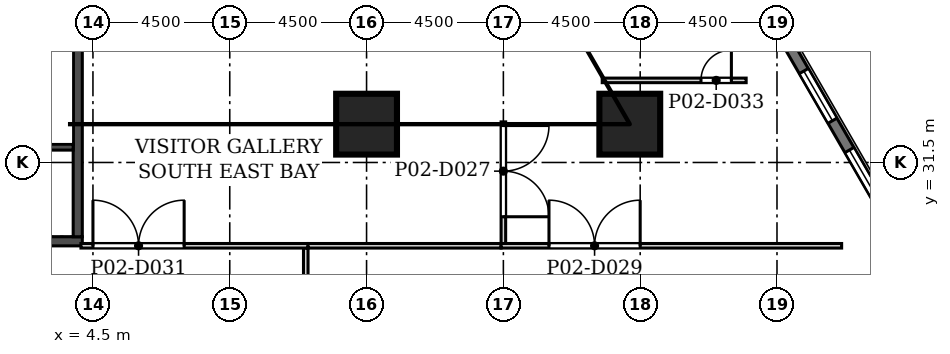
"""IFC4 building model, lengths in metres.
Left out: names, types, materials, properties, quantities, classifications, styles, units other than length and angle.
Written with IfcOpenShell. Run it as: python <this file> out.ifc"""

import sys

from ifc_helpers import new_model, si_unit, direction, frame, frame_2d, origin, origin_2d, place, context, subcontext, project, spatial, rectangle, extrude, element, fill, save


model = new_model("IFC4")
c1 = context("Model", 3, precision=1e-05, world=origin(), true_north=direction((0.0, 1.0)))
c2 = subcontext(c1, "Body", "Model", "MODEL_VIEW")
j1 = project(units=[si_unit("LENGTHUNIT", "METRE"), si_unit("PLANEANGLEUNIT", "RADIAN")], contexts=[c1])
p1 = place(None, origin())
s1 = spatial("IfcSite", under=j1, at=p1, CompositionType="ELEMENT")
p2 = place(p1, origin())
s2 = spatial("IfcBuilding", under=s1, at=p2, CompositionType="ELEMENT")
p3 = place(p2, frame((0.0, 0.0, 14.0)))
s3 = spatial("IfcBuildingStorey", under=s2, at=p3, CompositionType="ELEMENT", Elevation=14.0)
for number, where, z_axis, x_axis in (
    (1, (22.158, 32.76, 0.0), (0.0, 0.0, 1.0), (1.0, 0.0, 0.0)),
    (2, (13.5, 32.76, 0.0), (0.0, 0.0, 1.0), (1.0, 0.0, 0.0)),
):
    element("IfcColumn", number, at=place(p3, frame(where, z_axis=z_axis, x_axis=x_axis)), inside=s3, PredefinedType="COLUMN", context=c2, shape_type="SweptSolid", body=[
        extrude(rectangle(XDim=2.0, YDim=2.0, at=origin_2d()), origin(), (0.0, 0.0, 1.0), 6.0),
    ])
p4 = place(p3, frame((42.853, 8.575, 0.0), z_axis=(0.0, 0.0, 1.0), x_axis=(-0.49999894854, 0.866026010844, 0.0)))
e3 = element("IfcWall", 3, at=p4, inside=s3, PredefinedType="SOLIDWALL", context=c2, shape_type="SweptSolid", body=[
    extrude(rectangle(XDim=76.0, YDim=0.34, at=frame_2d((38.0, 0.0))), origin(), (0.0, 0.0, 1.0), 5.7),
])
p5 = place(p4, frame((1.058, 0.0, 0.9)))
e4 = element("IfcOpeningElement", 4, at=p5, cuts=e3, PredefinedType="OPENING", context=c2, shape_type="SweptSolid", body=[
    extrude(rectangle(XDim=1.885, YDim=3.5, at=frame_2d((0.942, 1.75))), frame((0.0, 0.18, 0.0), z_axis=(0.0, -1.0, 0.0), x_axis=(1.0, 0.0, 0.0)), (0.0, 0.0, 1.0), 0.36),
])
p6 = place(p4, frame((4.058, 0.0, 0.9)))
e5 = element("IfcOpeningElement", 5, at=p6, cuts=e3, PredefinedType="OPENING", context=c2, shape_type="SweptSolid", body=[
    extrude(rectangle(XDim=1.885, YDim=3.5, at=frame_2d((0.942, 1.75))), frame((0.0, 0.18, 0.0), z_axis=(0.0, -1.0, 0.0), x_axis=(1.0, 0.0, 0.0)), (0.0, 0.0, 1.0), 0.36),
])
p7 = place(p4, frame((7.058, 0.0, 0.9)))
e6 = element("IfcOpeningElement", 6, at=p7, cuts=e3, PredefinedType="OPENING", context=c2, shape_type="SweptSolid", body=[
    extrude(rectangle(XDim=1.885, YDim=3.5, at=frame_2d((0.942, 1.75))), frame((0.0, 0.18, 0.0), z_axis=(0.0, -1.0, 0.0), x_axis=(1.0, 0.0, 0.0)), (0.0, 0.0, 1.0), 0.36),
])
p8 = place(p4, frame((10.058, 0.0, 0.9)))
e7 = element("IfcOpeningElement", 7, at=p8, cuts=e3, PredefinedType="OPENING", context=c2, shape_type="SweptSolid", body=[
    extrude(rectangle(XDim=1.885, YDim=3.5, at=frame_2d((0.942, 1.75))), frame((0.0, 0.18, 0.0), z_axis=(0.0, -1.0, 0.0), x_axis=(1.0, 0.0, 0.0)), (0.0, 0.0, 1.0), 0.36),
])
p9 = place(p4, frame((13.058, 0.0, 0.9)))
e8 = element("IfcOpeningElement", 8, at=p9, cuts=e3, PredefinedType="OPENING", context=c2, shape_type="SweptSolid", body=[
    extrude(rectangle(XDim=1.885, YDim=3.5, at=frame_2d((0.942, 1.75))), frame((0.0, 0.18, 0.0), z_axis=(0.0, -1.0, 0.0), x_axis=(1.0, 0.0, 0.0)), (0.0, 0.0, 1.0), 0.36),
])
p10 = place(p4, frame((16.058, 0.0, 0.9)))
e9 = element("IfcOpeningElement", 9, at=p10, cuts=e3, PredefinedType="OPENING", context=c2, shape_type="SweptSolid", body=[
    extrude(rectangle(XDim=1.885, YDim=3.5, at=frame_2d((0.942, 1.75))), frame((0.0, 0.18, 0.0), z_axis=(0.0, -1.0, 0.0), x_axis=(1.0, 0.0, 0.0)), (0.0, 0.0, 1.0), 0.36),
])
p11 = place(p4, frame((19.058, 0.0, 0.9)))
e10 = element("IfcOpeningElement", 10, at=p11, cuts=e3, PredefinedType="OPENING", context=c2, shape_type="SweptSolid", body=[
    extrude(rectangle(XDim=1.885, YDim=3.5, at=frame_2d((0.942, 1.75))), frame((0.0, 0.18, 0.0), z_axis=(0.0, -1.0, 0.0), x_axis=(1.0, 0.0, 0.0)), (0.0, 0.0, 1.0), 0.36),
])
p12 = place(p4, frame((22.058, 0.0, 0.9)))
e11 = element("IfcOpeningElement", 11, at=p12, cuts=e3, PredefinedType="OPENING", context=c2, shape_type="SweptSolid", body=[
    extrude(rectangle(XDim=1.885, YDim=3.5, at=frame_2d((0.942, 1.75))), frame((0.0, 0.18, 0.0), z_axis=(0.0, -1.0, 0.0), x_axis=(1.0, 0.0, 0.0)), (0.0, 0.0, 1.0), 0.36),
])
p13 = place(p4, frame((25.058, 0.0, 0.9)))
e12 = element("IfcOpeningElement", 12, at=p13, cuts=e3, PredefinedType="OPENING", context=c2, shape_type="SweptSolid", body=[
    extrude(rectangle(XDim=1.885, YDim=3.5, at=frame_2d((0.942, 1.75))), frame((0.0, 0.18, 0.0), z_axis=(0.0, -1.0, 0.0), x_axis=(1.0, 0.0, 0.0)), (0.0, 0.0, 1.0), 0.36),
])
p14 = place(p4, frame((28.058, 0.0, 0.9)))
e13 = element("IfcOpeningElement", 13, at=p14, cuts=e3, PredefinedType="OPENING", context=c2, shape_type="SweptSolid", body=[
    extrude(rectangle(XDim=1.885, YDim=3.5, at=frame_2d((0.942, 1.75))), frame((0.0, 0.18, 0.0), z_axis=(0.0, -1.0, 0.0), x_axis=(1.0, 0.0, 0.0)), (0.0, 0.0, 1.0), 0.36),
])
p15 = place(p4, frame((31.058, 0.0, 0.9)))
e14 = element("IfcOpeningElement", 14, at=p15, cuts=e3, PredefinedType="OPENING", context=c2, shape_type="SweptSolid", body=[
    extrude(rectangle(XDim=1.885, YDim=3.5, at=frame_2d((0.942, 1.75))), frame((0.0, 0.18, 0.0), z_axis=(0.0, -1.0, 0.0), x_axis=(1.0, 0.0, 0.0)), (0.0, 0.0, 1.0), 0.36),
])
p16 = place(p4, frame((34.058, 0.0, 0.9)))
e15 = element("IfcOpeningElement", 15, at=p16, cuts=e3, PredefinedType="OPENING", context=c2, shape_type="SweptSolid", body=[
    extrude(rectangle(XDim=1.885, YDim=3.5, at=frame_2d((0.942, 1.75))), frame((0.0, 0.18, 0.0), z_axis=(0.0, -1.0, 0.0), x_axis=(1.0, 0.0, 0.0)), (0.0, 0.0, 1.0), 0.36),
])
p17 = place(p4, frame((37.058, 0.0, 0.9)))
e16 = element("IfcOpeningElement", 16, at=p17, cuts=e3, PredefinedType="OPENING", context=c2, shape_type="SweptSolid", body=[
    extrude(rectangle(XDim=1.885, YDim=3.5, at=frame_2d((0.942, 1.75))), frame((0.0, 0.18, 0.0), z_axis=(0.0, -1.0, 0.0), x_axis=(1.0, 0.0, 0.0)), (0.0, 0.0, 1.0), 0.36),
])
p18 = place(p4, frame((40.058, 0.0, 0.9)))
e17 = element("IfcOpeningElement", 17, at=p18, cuts=e3, PredefinedType="OPENING", context=c2, shape_type="SweptSolid", body=[
    extrude(rectangle(XDim=1.885, YDim=3.5, at=frame_2d((0.942, 1.75))), frame((0.0, 0.18, 0.0), z_axis=(0.0, -1.0, 0.0), x_axis=(1.0, 0.0, 0.0)), (0.0, 0.0, 1.0), 0.36),
])
p19 = place(p4, frame((43.058, 0.0, 0.9)))
e18 = element("IfcOpeningElement", 18, at=p19, cuts=e3, PredefinedType="OPENING", context=c2, shape_type="SweptSolid", body=[
    extrude(rectangle(XDim=1.885, YDim=3.5, at=frame_2d((0.942, 1.75))), frame((0.0, 0.18, 0.0), z_axis=(0.0, -1.0, 0.0), x_axis=(1.0, 0.0, 0.0)), (0.0, 0.0, 1.0), 0.36),
])
p20 = place(p4, frame((46.058, 0.0, 0.9)))
e19 = element("IfcOpeningElement", 19, at=p20, cuts=e3, PredefinedType="OPENING", context=c2, shape_type="SweptSolid", body=[
    extrude(rectangle(XDim=1.885, YDim=3.5, at=frame_2d((0.942, 1.75))), frame((0.0, 0.18, 0.0), z_axis=(0.0, -1.0, 0.0), x_axis=(1.0, 0.0, 0.0)), (0.0, 0.0, 1.0), 0.36),
])
p21 = place(p4, frame((49.058, 0.0, 0.9)))
e20 = element("IfcOpeningElement", 20, at=p21, cuts=e3, PredefinedType="OPENING", context=c2, shape_type="SweptSolid", body=[
    extrude(rectangle(XDim=1.885, YDim=3.5, at=frame_2d((0.942, 1.75))), frame((0.0, 0.18, 0.0), z_axis=(0.0, -1.0, 0.0), x_axis=(1.0, 0.0, 0.0)), (0.0, 0.0, 1.0), 0.36),
])
p22 = place(p4, frame((52.058, 0.0, 0.9)))
e21 = element("IfcOpeningElement", 21, at=p22, cuts=e3, PredefinedType="OPENING", context=c2, shape_type="SweptSolid", body=[
    extrude(rectangle(XDim=1.885, YDim=3.5, at=frame_2d((0.942, 1.75))), frame((0.0, 0.18, 0.0), z_axis=(0.0, -1.0, 0.0), x_axis=(1.0, 0.0, 0.0)), (0.0, 0.0, 1.0), 0.36),
])
p23 = place(p4, frame((55.058, 0.0, 0.9)))
e22 = element("IfcOpeningElement", 22, at=p23, cuts=e3, PredefinedType="OPENING", context=c2, shape_type="SweptSolid", body=[
    extrude(rectangle(XDim=1.885, YDim=3.5, at=frame_2d((0.942, 1.75))), frame((0.0, 0.18, 0.0), z_axis=(0.0, -1.0, 0.0), x_axis=(1.0, 0.0, 0.0)), (0.0, 0.0, 1.0), 0.36),
])
p24 = place(p4, frame((58.058, 0.0, 0.9)))
e23 = element("IfcOpeningElement", 23, at=p24, cuts=e3, PredefinedType="OPENING", context=c2, shape_type="SweptSolid", body=[
    extrude(rectangle(XDim=1.885, YDim=3.5, at=frame_2d((0.942, 1.75))), frame((0.0, 0.18, 0.0), z_axis=(0.0, -1.0, 0.0), x_axis=(1.0, 0.0, 0.0)), (0.0, 0.0, 1.0), 0.36),
])
p25 = place(p4, frame((61.058, 0.0, 0.9)))
e24 = element("IfcOpeningElement", 24, at=p25, cuts=e3, PredefinedType="OPENING", context=c2, shape_type="SweptSolid", body=[
    extrude(rectangle(XDim=1.885, YDim=3.5, at=frame_2d((0.942, 1.75))), frame((0.0, 0.18, 0.0), z_axis=(0.0, -1.0, 0.0), x_axis=(1.0, 0.0, 0.0)), (0.0, 0.0, 1.0), 0.36),
])
p26 = place(p4, frame((64.058, 0.0, 0.9)))
e25 = element("IfcOpeningElement", 25, at=p26, cuts=e3, PredefinedType="OPENING", context=c2, shape_type="SweptSolid", body=[
    extrude(rectangle(XDim=1.885, YDim=3.5, at=frame_2d((0.942, 1.75))), frame((0.0, 0.18, 0.0), z_axis=(0.0, -1.0, 0.0), x_axis=(1.0, 0.0, 0.0)), (0.0, 0.0, 1.0), 0.36),
])
p27 = place(p4, frame((67.058, 0.0, 0.9)))
e26 = element("IfcOpeningElement", 26, at=p27, cuts=e3, PredefinedType="OPENING", context=c2, shape_type="SweptSolid", body=[
    extrude(rectangle(XDim=1.885, YDim=3.5, at=frame_2d((0.942, 1.75))), frame((0.0, 0.18, 0.0), z_axis=(0.0, -1.0, 0.0), x_axis=(1.0, 0.0, 0.0)), (0.0, 0.0, 1.0), 0.36),
])
p28 = place(p4, frame((70.058, 0.0, 0.9)))
e27 = element("IfcOpeningElement", 27, at=p28, cuts=e3, PredefinedType="OPENING", context=c2, shape_type="SweptSolid", body=[
    extrude(rectangle(XDim=1.885, YDim=3.5, at=frame_2d((0.942, 1.75))), frame((0.0, 0.18, 0.0), z_axis=(0.0, -1.0, 0.0), x_axis=(1.0, 0.0, 0.0)), (0.0, 0.0, 1.0), 0.36),
])
p29 = place(p4, frame((73.058, 0.0, 0.9)))
e28 = element("IfcOpeningElement", 28, at=p29, cuts=e3, PredefinedType="OPENING", context=c2, shape_type="SweptSolid", body=[
    extrude(rectangle(XDim=1.885, YDim=3.5, at=frame_2d((0.942, 1.75))), frame((0.0, 0.18, 0.0), z_axis=(0.0, -1.0, 0.0), x_axis=(1.0, 0.0, 0.0)), (0.0, 0.0, 1.0), 0.36),
])
p30 = place(p3, frame((-4.15, 28.907, -0.3), z_axis=(0.0, 0.0, 1.0), x_axis=(1.0, 0.0, 0.0)))
e29 = element("IfcWall", 29, at=p30, inside=s3, PredefinedType="SOLIDWALL", context=c2, shape_type="SweptSolid", body=[
    extrude(rectangle(XDim=8.3, YDim=0.3, at=frame_2d((4.15, 0.0))), origin(), (0.0, 0.0, 1.0), 6.0),
])
p31 = place(p30, frame((1.55, 0.0, 0.3)))
e30 = element("IfcOpeningElement", 30, at=p31, cuts=e29, PredefinedType="OPENING", context=c2, shape_type="SweptSolid", body=[
    extrude(rectangle(XDim=1.2, YDim=2.1, at=frame_2d((0.6, 1.05))), frame((0.0, 0.16, 0.0), z_axis=(0.0, -1.0, 0.0), x_axis=(1.0, 0.0, 0.0)), (0.0, 0.0, 1.0), 0.32),
])
p32 = place(p3, frame((4.0, 29.057, -0.3), z_axis=(0.0, 0.0, 1.0), x_axis=(0.0, 1.0, 0.0)))
e31 = element("IfcWall", 31, at=p32, inside=s3, PredefinedType="SOLIDWALL", context=c2, shape_type="SweptSolid", body=[
    extrude(rectangle(XDim=6.5, YDim=0.3, at=frame_2d((3.25, 0.0))), origin(), (0.0, 0.0, 1.0), 6.0),
])
p33 = place(p3, frame((-3.85, 32.007, -0.3), z_axis=(0.0, 0.0, 1.0), x_axis=(1.0, 0.0, 0.0)))
e32 = element("IfcWall", 32, at=p33, inside=s3, PredefinedType="SOLIDWALL", context=c2, shape_type="SweptSolid", body=[
    extrude(rectangle(XDim=7.7, YDim=0.2, at=frame_2d((3.85, 0.0))), origin(), (0.0, 0.0, 1.0), 6.0),
])
p34 = place(p33, frame((0.1, 0.0, 0.3)))
e33 = element("IfcOpeningElement", 33, at=p34, cuts=e32, PredefinedType="OPENING", context=c2, shape_type="SweptSolid", body=[
    extrude(rectangle(XDim=1.2, YDim=2.1, at=frame_2d((0.6, 1.05))), frame((0.0, 0.11, 0.0), z_axis=(0.0, -1.0, 0.0), x_axis=(1.0, 0.0, 0.0)), (0.0, 0.0, 1.0), 0.22),
])
p35 = place(p3, frame((11.5, 28.685, 0.0), z_axis=(0.0, 0.0, 1.0), x_axis=(0.0, -1.0, 0.0)))
e34 = element("IfcWall", 34, at=p35, inside=s3, PredefinedType="PARTITIONING", context=c2, shape_type="SweptSolid", body=[
    extrude(rectangle(XDim=5.76, YDim=0.15, at=frame_2d((2.88, 0.0))), origin(), (0.0, 0.0, 1.0), 5.7),
])
p36 = place(p35, frame((1.185, 0.0, 0.0)))
e35 = element("IfcOpeningElement", 35, at=p36, cuts=e34, PredefinedType="OPENING", context=c2, shape_type="SweptSolid", body=[
    extrude(rectangle(XDim=3.0, YDim=2.4, at=frame_2d((1.5, 1.2))), frame((0.0, 0.085, 0.0), z_axis=(0.0, -1.0, 0.0), x_axis=(1.0, 0.0, 0.0)), (0.0, 0.0, 1.0), 0.17),
])
p37 = place(p3, frame((4.105, 28.76, 0.0), z_axis=(0.0, 0.0, 1.0), x_axis=(1.0, 0.0, 0.0)))
e36 = element("IfcWall", 36, at=p37, inside=s3, PredefinedType="PARTITIONING", context=c2, shape_type="SweptSolid", body=[
    extrude(rectangle(XDim=7.47, YDim=0.15, at=frame_2d((3.735, 0.0))), origin(), (0.0, 0.0, 1.0), 5.7),
])
p38 = place(p37, frame((0.395, 0.0, 0.0)))
e37 = element("IfcOpeningElement", 37, at=p38, cuts=e36, PredefinedType="OPENING", context=c2, shape_type="SweptSolid", body=[
    extrude(rectangle(XDim=3.0, YDim=2.4, at=frame_2d((1.5, 1.2))), frame((0.0, 0.085, 0.0), z_axis=(0.0, -1.0, 0.0), x_axis=(1.0, 0.0, 0.0)), (0.0, 0.0, 1.0), 0.17),
])
p39 = place(p3, frame((11.575, 28.76, 0.0), z_axis=(0.0, 0.0, 1.0), x_axis=(1.0, 0.0, 0.0)))
e38 = element("IfcWall", 38, at=p39, inside=s3, PredefinedType="PARTITIONING", context=c2, shape_type="SweptSolid", body=[
    extrude(rectangle(XDim=6.35, YDim=0.15, at=frame_2d((3.175, 0.0))), origin(), (0.0, 0.0, 1.0), 5.7),
])
p40 = place(p3, frame((17.925, 28.76, 0.0), z_axis=(0.0, 0.0, 1.0), x_axis=(1.0, 0.0, 0.0)))
e39 = element("IfcWall", 39, at=p40, inside=s3, PredefinedType="PARTITIONING", context=c2, shape_type="SweptSolid", body=[
    extrude(rectangle(XDim=11.201, YDim=0.15, at=frame_2d((5.601, 0.0))), origin(), (0.0, 0.0, 1.0), 5.7),
])
p41 = place(p40, frame((1.575, 0.0, 0.0)))
e40 = element("IfcOpeningElement", 40, at=p41, cuts=e39, PredefinedType="OPENING", context=c2, shape_type="SweptSolid", body=[
    extrude(rectangle(XDim=3.0, YDim=2.4, at=frame_2d((1.5, 1.2))), frame((0.0, 0.085, 0.0), z_axis=(0.0, -1.0, 0.0), x_axis=(1.0, 0.0, 0.0)), (0.0, 0.0, 1.0), 0.17),
])
p42 = place(p3, frame((18.0, 28.835, 0.0), z_axis=(0.0, 0.0, 1.0), x_axis=(0.0, 1.0, 0.0)))
e41 = element("IfcWall", 41, at=p42, inside=s3, PredefinedType="PARTITIONING", context=c2, shape_type="SweptSolid", body=[
    extrude(rectangle(XDim=4.0, YDim=0.15, at=frame_2d((2.0, 0.0))), origin(), (0.0, 0.0, 1.0), 5.7),
])
p43 = place(p42, frame((0.88, 0.0, 0.0)))
e42 = element("IfcOpeningElement", 42, at=p43, cuts=e41, PredefinedType="OPENING", context=c2, shape_type="SweptSolid", body=[
    extrude(rectangle(XDim=3.0, YDim=2.4, at=frame_2d((1.5, 1.2))), frame((0.0, 0.085, 0.0), z_axis=(0.0, -1.0, 0.0), x_axis=(1.0, 0.0, 0.0)), (0.0, 0.0, 1.0), 0.17),
])
p44 = place(p3, frame((21.251, 34.2, 0.0), z_axis=(0.0, 0.0, 1.0), x_axis=(1.0, 0.0, 0.0)))
e43 = element("IfcWall", 43, at=p44, inside=s3, PredefinedType="PARTITIONING", context=c2, shape_type="SweptSolid", body=[
    extrude(rectangle(XDim=4.734, YDim=0.15, at=frame_2d((2.367, 0.0))), origin(), (0.0, 0.0, 1.0), 5.7),
])
p45 = place(p44, frame((3.249, 0.0, 0.0)))
e44 = element("IfcOpeningElement", 44, at=p45, cuts=e43, PredefinedType="OPENING", context=c2, shape_type="SweptSolid", body=[
    extrude(rectangle(XDim=1.0, YDim=2.1, at=frame_2d((0.5, 1.05))), frame((0.0, 0.085, 0.0), z_axis=(0.0, -1.0, 0.0), x_axis=(1.0, 0.0, 0.0)), (0.0, 0.0, 1.0), 0.17),
])
p46 = place(p13, origin())
e45 = element("IfcWindow", 45, at=p46, inside=s3, PartitioningType="SINGLE_PANEL", PredefinedType="WINDOW", context=c2, shape_type="SweptSolid", body=[
    extrude(rectangle(XDim=1.885, YDim=3.5, at=frame_2d((0.942, 1.75))), frame((0.0, 0.11, 0.0), z_axis=(0.0, -1.0, 0.0), x_axis=(1.0, 0.0, 0.0)), (0.0, 0.0, 1.0), 0.06),
])
fill(e12, e45)
p47 = place(p14, origin())
e46 = element("IfcWindow", 46, at=p47, inside=s3, PartitioningType="SINGLE_PANEL", PredefinedType="WINDOW", context=c2, shape_type="SweptSolid", body=[
    extrude(rectangle(XDim=1.885, YDim=3.5, at=frame_2d((0.942, 1.75))), frame((0.0, 0.11, 0.0), z_axis=(0.0, -1.0, 0.0), x_axis=(1.0, 0.0, 0.0)), (0.0, 0.0, 1.0), 0.06),
])
fill(e13, e46)
p48 = place(p43, frame((3.0, 0.0, 0.0), z_axis=(0.0, 0.0, 1.0), x_axis=(-1.0, 0.0, 0.0)))
e47 = element("IfcDoor", 47, at=p48, inside=s3, OperationType="DOUBLE_DOOR_SINGLE_SWING", PredefinedType="DOOR", context=c2, shape_type="SweptSolid", body=[
    extrude(rectangle(XDim=3.0, YDim=2.4, at=frame_2d((1.5, 1.2))), frame((0.0, 0.025, 0.0), z_axis=(0.0, -1.0, 0.0), x_axis=(1.0, 0.0, 0.0)), (0.0, 0.0, 1.0), 0.05),
])
fill(e42, e47)
p49 = place(p41, origin())
e48 = element("IfcDoor", 48, at=p49, inside=s3, OperationType="DOUBLE_DOOR_SINGLE_SWING", PredefinedType="DOOR", context=c2, shape_type="SweptSolid", body=[
    extrude(rectangle(XDim=3.0, YDim=2.4, at=frame_2d((1.5, 1.2))), frame((0.0, 0.025, 0.0), z_axis=(0.0, -1.0, 0.0), x_axis=(1.0, 0.0, 0.0)), (0.0, 0.0, 1.0), 0.05),
])
fill(e40, e48)
p50 = place(p38, origin())
e49 = element("IfcDoor", 49, at=p50, inside=s3, OperationType="DOUBLE_DOOR_SINGLE_SWING", PredefinedType="DOOR", context=c2, shape_type="SweptSolid", body=[
    extrude(rectangle(XDim=3.0, YDim=2.4, at=frame_2d((1.5, 1.2))), frame((0.0, 0.025, 0.0), z_axis=(0.0, -1.0, 0.0), x_axis=(1.0, 0.0, 0.0)), (0.0, 0.0, 1.0), 0.05),
])
fill(e37, e49)
p51 = place(p45, origin())
e50 = element("IfcDoor", 50, at=p51, inside=s3, OperationType="SINGLE_SWING_RIGHT", PredefinedType="DOOR", context=c2, shape_type="SweptSolid", body=[
    extrude(rectangle(XDim=1.0, YDim=2.1, at=frame_2d((0.5, 1.05))), frame((0.0, 0.025, 0.0), z_axis=(0.0, -1.0, 0.0), x_axis=(1.0, 0.0, 0.0)), (0.0, 0.0, 1.0), 0.05),
])
fill(e44, e50)
save(model, sys.argv[1])
